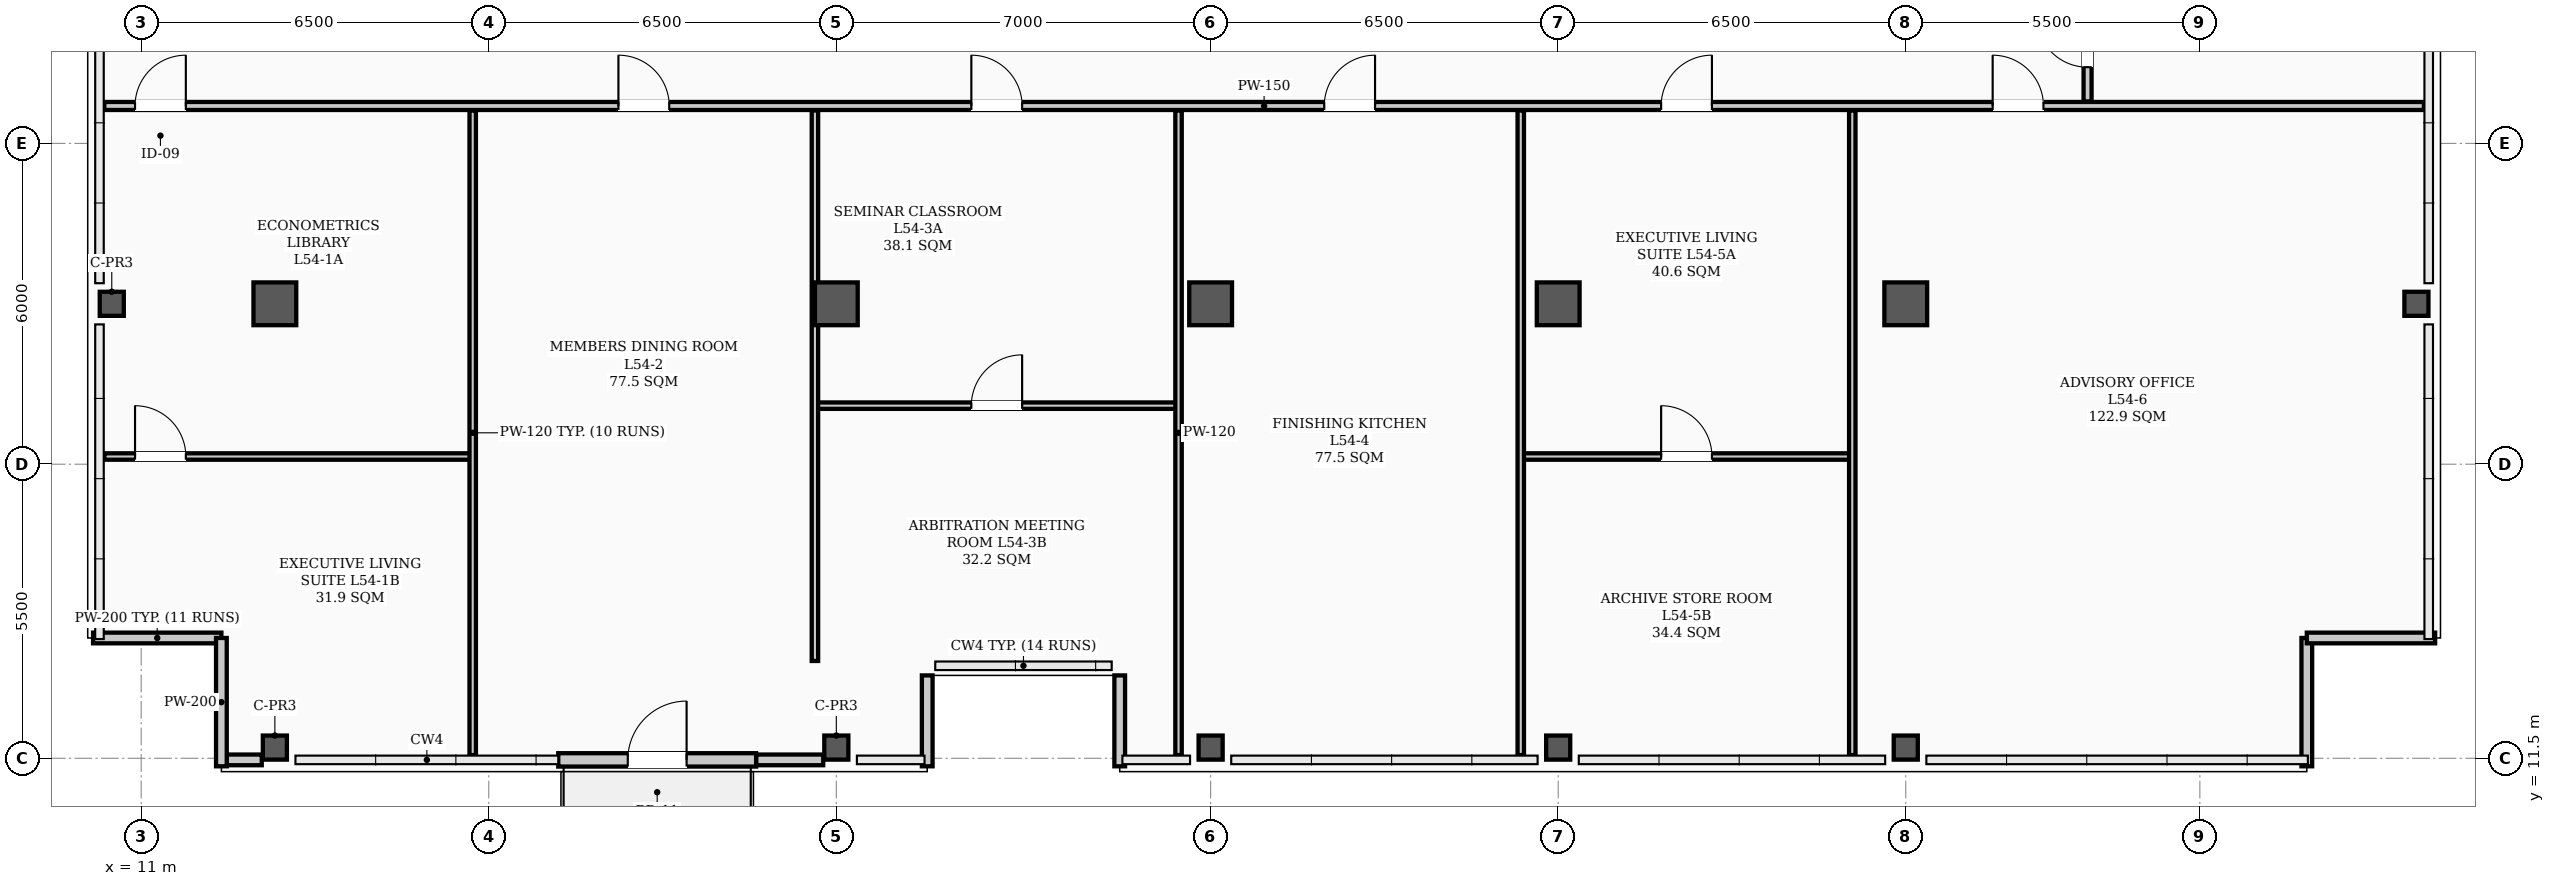
"""IFC4 building model, lengths in metres.
Left out: names, types, materials, properties, quantities, classifications, styles, units other than length and angle.
Written with IfcOpenShell. Run it as: python <this file> out.ifc"""

import sys

from ifc_helpers import new_model, si_unit, direction, frame, frame_2d, origin, origin_2d, place, context, subcontext, project, spatial, rectangle, hollow_rectangle, extrude, element, fill, save


model = new_model("IFC4")
c1 = context("Model", 3, precision=1e-05, world=origin(), true_north=direction((0.0, 1.0)))
c2 = subcontext(c1, "Body", "Model", "MODEL_VIEW")
j1 = project(units=[si_unit("LENGTHUNIT", "METRE"), si_unit("PLANEANGLEUNIT", "RADIAN")], contexts=[c1])
p1 = place(None, origin())
s1 = spatial("IfcSite", under=j1, at=p1, CompositionType="ELEMENT")
p2 = place(p1, origin())
s2 = spatial("IfcBuilding", under=s1, at=p2, CompositionType="ELEMENT")
p3 = place(p2, frame((0.0, 0.0, 218.9)))
s3 = spatial("IfcBuildingStorey", under=s2, at=p3, CompositionType="ELEMENT", Elevation=218.9)
for number, where, z_axis, x_axis in (
    (1, (13.5, 20.0, 0.0), (0.0, 0.0, 1.0), (1.0, 0.0, 0.0)),
    (2, (24.0, 20.0, 0.0), (0.0, 0.0, 1.0), (1.0, 0.0, 0.0)),
    (3, (31.0, 20.0, 0.0), (0.0, 0.0, 1.0), (1.0, 0.0, 0.0)),
    (4, (37.5, 20.0, 0.0), (0.0, 0.0, 1.0), (1.0, 0.0, 0.0)),
    (5, (44.0, 20.0, 0.0), (0.0, 0.0, 1.0), (1.0, 0.0, 0.0)),
):
    element("IfcColumn", number, at=place(p3, frame(where, z_axis=z_axis, x_axis=x_axis)), inside=s3, PredefinedType="COLUMN", context=c2, shape_type="SweptSolid", body=[
        extrude(hollow_rectangle(XDim=0.8, YDim=0.8, WallThickness=0.032, InnerFilletRadius=0.016, OuterFilletRadius=0.048, at=origin_2d()), origin(), (0.0, 0.0, 1.0), 3.9),
    ])
for number, where, z_axis, x_axis in (
    (6, (10.45, 20.0, 0.0), (0.0, 0.0, 1.0), (1.0, 0.0, 0.0)),
    (7, (13.5, 11.7, 0.0), (0.0, 0.0, 1.0), (1.0, 0.0, 0.0)),
    (8, (24.0, 11.7, 0.0), (0.0, 0.0, 1.0), (1.0, 0.0, 0.0)),
    (9, (31.0, 11.7, 0.0), (0.0, 0.0, 1.0), (1.0, 0.0, 0.0)),
    (10, (37.5, 11.7, 0.0), (0.0, 0.0, 1.0), (1.0, 0.0, 0.0)),
    (11, (44.0, 11.7, 0.0), (0.0, 0.0, 1.0), (1.0, 0.0, 0.0)),
    (12, (53.55, 20.0, 0.0), (0.0, 0.0, 1.0), (1.0, 0.0, 0.0)),
):
    element("IfcColumn", number, at=place(p3, frame(where, z_axis=z_axis, x_axis=x_axis)), inside=s3, PredefinedType="COLUMN", context=c2, shape_type="SweptSolid", body=[
        extrude(hollow_rectangle(XDim=0.45, YDim=0.45, WallThickness=0.022, InnerFilletRadius=0.022, OuterFilletRadius=0.044, at=origin_2d()), origin(), (0.0, 0.0, 1.0), 3.9),
    ])
p4 = place(p3, frame((12.6, 11.47, 0.0), z_axis=(0.0, 0.0, 1.0), x_axis=(1.0, 0.0, 0.0)))
e13 = element("IfcWall", 13, at=p4, inside=s3, PredefinedType="PARAPET", context=c2, shape_type="SweptSolid", body=[
    extrude(rectangle(XDim=0.655, YDim=0.2, at=frame_2d((0.327, 0.0))), origin(), (0.0, 0.0, 1.0), 1.2),
])
p5 = place(p3, frame((22.5, 11.47, 0.0), z_axis=(0.0, 0.0, 1.0), x_axis=(1.0, 0.0, 0.0)))
e14 = element("IfcWall", 14, at=p5, inside=s3, PredefinedType="PARAPET", context=c2, shape_type="SweptSolid", body=[
    extrude(rectangle(XDim=1.255, YDim=0.2, at=frame_2d((0.627, 0.0))), origin(), (0.0, 0.0, 1.0), 1.2),
])
for number, where, z_axis, x_axis in (
    (15, (10.1, 13.75, 0.0), (0.0, 0.0, 1.0), (1.0, 0.0, 0.0)),
    (16, (12.5, 13.75, 0.0), (0.0, 0.0, 1.0), (0.0, -1.0, 0.0)),
    (17, (51.5, 11.35, 0.0), (0.0, 0.0, 1.0), (0.0, 1.0, 0.0)),
    (18, (51.5, 13.75, 0.0), (0.0, 0.0, 1.0), (1.0, 0.0, 0.0)),
):
    element("IfcWall", number, at=place(p3, frame(where, z_axis=z_axis, x_axis=x_axis)), inside=s3, PredefinedType="PARAPET", context=c2, shape_type="SweptSolid", body=[
        extrude(rectangle(XDim=2.4, YDim=0.2, at=frame_2d((1.2, 0.0))), origin(), (0.0, 0.0, 1.0), 1.2),
    ])
for number, where, z_axis, x_axis in (
    (19, (25.7, 11.35, 0.0), (0.0, 0.0, 1.0), (0.0, 1.0, 0.0)),
    (20, (29.3, 13.05, 0.0), (0.0, 0.0, 1.0), (0.0, -1.0, 0.0)),
):
    element("IfcWall", number, at=place(p3, frame(where, z_axis=z_axis, x_axis=x_axis)), inside=s3, PredefinedType="PARAPET", context=c2, shape_type="SweptSolid", body=[
        extrude(rectangle(XDim=1.7, YDim=0.2, at=frame_2d((0.85, 0.0))), origin(), (0.0, 0.0, 1.0), 1.2),
    ])
p6 = place(p3, frame((18.8, 11.47, 0.0), z_axis=(0.0, 0.0, 1.0), x_axis=(1.0, 0.0, 0.0)))
e21 = element("IfcWall", 21, at=p6, inside=s3, PredefinedType="STANDARD", context=c2, shape_type="SweptSolid", body=[
    extrude(rectangle(XDim=3.7, YDim=0.25, at=frame_2d((1.85, 0.0))), origin(), (0.0, 0.0, 1.0), 3.18),
])
p7 = place(p6, frame((1.3, 0.0, 0.0)))
e22 = element("IfcOpeningElement", 22, at=p7, cuts=e21, PredefinedType="OPENING", context=c2, shape_type="SweptSolid", body=[
    extrude(rectangle(XDim=1.1, YDim=2.2, at=frame_2d((0.55, 1.1))), frame((0.0, 0.135, 0.0), z_axis=(0.0, -1.0, 0.0), x_axis=(1.0, 0.0, 0.0)), (0.0, 0.0, 1.0), 0.27),
])
p8 = place(p3, frame((10.31, 23.7, 0.0), z_axis=(0.0, 0.0, 1.0), x_axis=(1.0, 0.0, 0.0)))
e23 = element("IfcWall", 23, at=p8, inside=s3, PredefinedType="PARTITIONING", context=c2, shape_type="SweptSolid", body=[
    extrude(rectangle(XDim=43.38, YDim=0.15, at=frame_2d((21.69, 0.0))), origin(), (0.0, 0.0, 1.0), 3.2),
])
p9 = place(p8, frame((0.575, 0.0, 0.0)))
e24 = element("IfcOpeningElement", 24, at=p9, cuts=e23, PredefinedType="OPENING", context=c2, shape_type="SweptSolid", body=[
    extrude(rectangle(XDim=0.95, YDim=2.08, at=frame_2d((0.475, 1.04))), frame((0.0, 0.085, 0.0), z_axis=(0.0, -1.0, 0.0), x_axis=(1.0, 0.0, 0.0)), (0.0, 0.0, 1.0), 0.17),
])
p10 = place(p8, frame((9.615, 0.0, 0.0)))
e25 = element("IfcOpeningElement", 25, at=p10, cuts=e23, PredefinedType="OPENING", context=c2, shape_type="SweptSolid", body=[
    extrude(rectangle(XDim=0.95, YDim=2.08, at=frame_2d((0.475, 1.04))), frame((0.0, 0.085, 0.0), z_axis=(0.0, -1.0, 0.0), x_axis=(1.0, 0.0, 0.0)), (0.0, 0.0, 1.0), 0.17),
])
p11 = place(p8, frame((16.215, 0.0, 0.0)))
e26 = element("IfcOpeningElement", 26, at=p11, cuts=e23, PredefinedType="OPENING", context=c2, shape_type="SweptSolid", body=[
    extrude(rectangle(XDim=0.95, YDim=2.08, at=frame_2d((0.475, 1.04))), frame((0.0, 0.085, 0.0), z_axis=(0.0, -1.0, 0.0), x_axis=(1.0, 0.0, 0.0)), (0.0, 0.0, 1.0), 0.17),
])
p12 = place(p8, frame((22.815, 0.0, 0.0)))
e27 = element("IfcOpeningElement", 27, at=p12, cuts=e23, PredefinedType="OPENING", context=c2, shape_type="SweptSolid", body=[
    extrude(rectangle(XDim=0.95, YDim=2.08, at=frame_2d((0.475, 1.04))), frame((0.0, 0.085, 0.0), z_axis=(0.0, -1.0, 0.0), x_axis=(1.0, 0.0, 0.0)), (0.0, 0.0, 1.0), 0.17),
])
p13 = place(p8, frame((29.115, 0.0, 0.0)))
e28 = element("IfcOpeningElement", 28, at=p13, cuts=e23, PredefinedType="OPENING", context=c2, shape_type="SweptSolid", body=[
    extrude(rectangle(XDim=0.95, YDim=2.08, at=frame_2d((0.475, 1.04))), frame((0.0, 0.085, 0.0), z_axis=(0.0, -1.0, 0.0), x_axis=(1.0, 0.0, 0.0)), (0.0, 0.0, 1.0), 0.17),
])
p14 = place(p8, frame((35.315, 0.0, 0.0)))
e29 = element("IfcOpeningElement", 29, at=p14, cuts=e23, PredefinedType="OPENING", context=c2, shape_type="SweptSolid", body=[
    extrude(rectangle(XDim=0.95, YDim=2.08, at=frame_2d((0.475, 1.04))), frame((0.0, 0.085, 0.0), z_axis=(0.0, -1.0, 0.0), x_axis=(1.0, 0.0, 0.0)), (0.0, 0.0, 1.0), 0.17),
])
p15 = place(p3, frame((10.31, 17.144, 0.0), z_axis=(0.0, 0.0, 1.0), x_axis=(1.0, 0.0, 0.0)))
e30 = element("IfcWall", 30, at=p15, inside=s3, PredefinedType="PARTITIONING", context=c2, shape_type="SweptSolid", body=[
    extrude(rectangle(XDim=6.89, YDim=0.12, at=frame_2d((3.445, 0.0))), origin(), (0.0, 0.0, 1.0), 3.2),
])
p16 = place(p15, frame((0.575, 0.0, 0.0)))
e31 = element("IfcOpeningElement", 31, at=p16, cuts=e30, PredefinedType="OPENING", context=c2, shape_type="SweptSolid", body=[
    extrude(rectangle(XDim=0.95, YDim=2.08, at=frame_2d((0.475, 1.04))), frame((0.0, 0.07, 0.0), z_axis=(0.0, -1.0, 0.0), x_axis=(1.0, 0.0, 0.0)), (0.0, 0.0, 1.0), 0.14),
])
p17 = place(p3, frame((23.6, 18.095, 0.0), z_axis=(0.0, 0.0, 1.0), x_axis=(1.0, 0.0, 0.0)))
e32 = element("IfcWall", 32, at=p17, inside=s3, PredefinedType="PARTITIONING", context=c2, shape_type="SweptSolid", body=[
    extrude(rectangle(XDim=6.8, YDim=0.12, at=frame_2d((3.4, 0.0))), origin(), (0.0, 0.0, 1.0), 3.2),
])
p18 = place(p17, frame((2.925, 0.0, 0.0)))
e33 = element("IfcOpeningElement", 33, at=p18, cuts=e32, PredefinedType="OPENING", context=c2, shape_type="SweptSolid", body=[
    extrude(rectangle(XDim=0.95, YDim=2.08, at=frame_2d((0.475, 1.04))), frame((0.0, 0.07, 0.0), z_axis=(0.0, -1.0, 0.0), x_axis=(1.0, 0.0, 0.0)), (0.0, 0.0, 1.0), 0.14),
])
p19 = place(p3, frame((36.8, 17.144, 0.0), z_axis=(0.0, 0.0, 1.0), x_axis=(1.0, 0.0, 0.0)))
e34 = element("IfcWall", 34, at=p19, inside=s3, PredefinedType="PARTITIONING", context=c2, shape_type="SweptSolid", body=[
    extrude(rectangle(XDim=6.2, YDim=0.12, at=frame_2d((3.1, 0.0))), origin(), (0.0, 0.0, 1.0), 3.2),
])
p20 = place(p19, frame((2.625, 0.0, 0.0)))
e35 = element("IfcOpeningElement", 35, at=p20, cuts=e34, PredefinedType="OPENING", context=c2, shape_type="SweptSolid", body=[
    extrude(rectangle(XDim=0.95, YDim=2.08, at=frame_2d((0.475, 1.04))), frame((0.0, 0.07, 0.0), z_axis=(0.0, -1.0, 0.0), x_axis=(1.0, 0.0, 0.0)), (0.0, 0.0, 1.0), 0.14),
])
p21 = place(p3, frame((47.4, 23.785, 0.0), z_axis=(0.0, 0.0, 1.0), x_axis=(0.0, 1.0, 0.0)))
e36 = element("IfcWall", 36, at=p21, inside=s3, PredefinedType="PARTITIONING", context=c2, shape_type="SweptSolid", body=[
    extrude(rectangle(XDim=13.13, YDim=0.15, at=frame_2d((6.565, 0.0))), origin(), (0.0, 0.0, 1.0), 3.1),
])
p22 = place(p21, frame((0.64, 0.0, 0.0)))
e37 = element("IfcOpeningElement", 37, at=p22, cuts=e36, PredefinedType="OPENING", context=c2, shape_type="SweptSolid", body=[
    extrude(rectangle(XDim=0.95, YDim=2.08, at=frame_2d((0.475, 1.04))), frame((0.0, 0.085, 0.0), z_axis=(0.0, -1.0, 0.0), x_axis=(1.0, 0.0, 0.0)), (0.0, 0.0, 1.0), 0.17),
])
p23 = place(p21, frame((10.44, 0.0, 0.0)))
e38 = element("IfcOpeningElement", 38, at=p23, cuts=e36, PredefinedType="OPENING", context=c2, shape_type="SweptSolid", body=[
    extrude(rectangle(XDim=0.95, YDim=2.08, at=frame_2d((0.475, 1.04))), frame((0.0, 0.085, 0.0), z_axis=(0.0, -1.0, 0.0), x_axis=(1.0, 0.0, 0.0)), (0.0, 0.0, 1.0), 0.17),
])
p24 = place(p3, frame((17.2, 11.56, 0.0), z_axis=(0.0, 0.0, 1.0), x_axis=(0.0, 1.0, 0.0)))
e39 = element("IfcWall", 39, at=p24, inside=s3, PredefinedType="PARTITIONING", context=c2, shape_type="SweptSolid", body=[
    extrude(rectangle(XDim=12.055, YDim=0.12, at=frame_2d((6.027, 0.0))), origin(), (0.0, 0.0, 1.0), 3.1),
])
p25 = place(p3, frame((23.6, 13.32, 0.0), z_axis=(0.0, 0.0, 1.0), x_axis=(0.0, 1.0, 0.0)))
e40 = element("IfcWall", 40, at=p25, inside=s3, PredefinedType="PARTITIONING", context=c2, shape_type="SweptSolid", body=[
    extrude(rectangle(XDim=10.295, YDim=0.12, at=frame_2d((5.147, 0.0))), origin(), (0.0, 0.0, 1.0), 3.1),
])
for number, where, z_axis, x_axis in (
    (41, (30.4, 11.56, 0.0), (0.0, 0.0, 1.0), (0.0, 1.0, 0.0)),
    (42, (36.8, 11.56, 0.0), (0.0, 0.0, 1.0), (0.0, 1.0, 0.0)),
    (43, (43.0, 11.56, 0.0), (0.0, 0.0, 1.0), (0.0, 1.0, 0.0)),
):
    element("IfcWall", number, at=place(p3, frame(where, z_axis=z_axis, x_axis=x_axis)), inside=s3, PredefinedType="PARTITIONING", context=c2, shape_type="SweptSolid", body=[
        extrude(rectangle(XDim=12.055, YDim=0.12, at=frame_2d((6.027, 0.0))), origin(), (0.0, 0.0, 1.0), 3.1),
    ])
p26 = place(p7, origin())
e44 = element("IfcDoor", 44, at=p26, inside=s3, OperationType="SINGLE_SWING_RIGHT", PredefinedType="DOOR", context=c2, shape_type="SweptSolid", body=[
    extrude(rectangle(XDim=1.1, YDim=2.2, at=frame_2d((0.55, 1.1))), frame((0.0, 0.025, 0.0), z_axis=(0.0, -1.0, 0.0), x_axis=(1.0, 0.0, 0.0)), (0.0, 0.0, 1.0), 0.05),
])
fill(e22, e44)
p27 = place(p16, origin())
e45 = element("IfcDoor", 45, at=p27, inside=s3, OperationType="SINGLE_SWING_LEFT", PredefinedType="DOOR", context=c2, shape_type="SweptSolid", body=[
    extrude(rectangle(XDim=0.95, YDim=2.08, at=frame_2d((0.475, 1.04))), frame((0.0, 0.025, 0.0), z_axis=(0.0, -1.0, 0.0), x_axis=(1.0, 0.0, 0.0)), (0.0, 0.0, 1.0), 0.05),
])
fill(e31, e45)
p28 = place(p9, origin())
e46 = element("IfcDoor", 46, at=p28, inside=s3, OperationType="SINGLE_SWING_RIGHT", PredefinedType="DOOR", context=c2, shape_type="SweptSolid", body=[
    extrude(rectangle(XDim=0.95, YDim=2.08, at=frame_2d((0.475, 1.04))), frame((0.0, 0.025, 0.0), z_axis=(0.0, -1.0, 0.0), x_axis=(1.0, 0.0, 0.0)), (0.0, 0.0, 1.0), 0.05),
])
fill(e24, e46)
p29 = place(p10, origin())
e47 = element("IfcDoor", 47, at=p29, inside=s3, OperationType="SINGLE_SWING_LEFT", PredefinedType="DOOR", context=c2, shape_type="SweptSolid", body=[
    extrude(rectangle(XDim=0.95, YDim=2.08, at=frame_2d((0.475, 1.04))), frame((0.0, 0.025, 0.0), z_axis=(0.0, -1.0, 0.0), x_axis=(1.0, 0.0, 0.0)), (0.0, 0.0, 1.0), 0.05),
])
fill(e25, e47)
p30 = place(p18, origin())
e48 = element("IfcDoor", 48, at=p30, inside=s3, OperationType="SINGLE_SWING_RIGHT", PredefinedType="DOOR", context=c2, shape_type="SweptSolid", body=[
    extrude(rectangle(XDim=0.95, YDim=2.08, at=frame_2d((0.475, 1.04))), frame((0.0, 0.025, 0.0), z_axis=(0.0, -1.0, 0.0), x_axis=(1.0, 0.0, 0.0)), (0.0, 0.0, 1.0), 0.05),
])
fill(e33, e48)
p31 = place(p11, origin())
e49 = element("IfcDoor", 49, at=p31, inside=s3, OperationType="SINGLE_SWING_LEFT", PredefinedType="DOOR", context=c2, shape_type="SweptSolid", body=[
    extrude(rectangle(XDim=0.95, YDim=2.08, at=frame_2d((0.475, 1.04))), frame((0.0, 0.025, 0.0), z_axis=(0.0, -1.0, 0.0), x_axis=(1.0, 0.0, 0.0)), (0.0, 0.0, 1.0), 0.05),
])
fill(e26, e49)
p32 = place(p12, origin())
e50 = element("IfcDoor", 50, at=p32, inside=s3, OperationType="SINGLE_SWING_RIGHT", PredefinedType="DOOR", context=c2, shape_type="SweptSolid", body=[
    extrude(rectangle(XDim=0.95, YDim=2.08, at=frame_2d((0.475, 1.04))), frame((0.0, 0.025, 0.0), z_axis=(0.0, -1.0, 0.0), x_axis=(1.0, 0.0, 0.0)), (0.0, 0.0, 1.0), 0.05),
])
fill(e27, e50)
p33 = place(p20, origin())
e51 = element("IfcDoor", 51, at=p33, inside=s3, OperationType="SINGLE_SWING_LEFT", PredefinedType="DOOR", context=c2, shape_type="SweptSolid", body=[
    extrude(rectangle(XDim=0.95, YDim=2.08, at=frame_2d((0.475, 1.04))), frame((0.0, 0.025, 0.0), z_axis=(0.0, -1.0, 0.0), x_axis=(1.0, 0.0, 0.0)), (0.0, 0.0, 1.0), 0.05),
])
fill(e35, e51)
p34 = place(p13, origin())
e52 = element("IfcDoor", 52, at=p34, inside=s3, OperationType="SINGLE_SWING_RIGHT", PredefinedType="DOOR", context=c2, shape_type="SweptSolid", body=[
    extrude(rectangle(XDim=0.95, YDim=2.08, at=frame_2d((0.475, 1.04))), frame((0.0, 0.025, 0.0), z_axis=(0.0, -1.0, 0.0), x_axis=(1.0, 0.0, 0.0)), (0.0, 0.0, 1.0), 0.05),
])
fill(e28, e52)
p35 = place(p14, origin())
e53 = element("IfcDoor", 53, at=p35, inside=s3, OperationType="SINGLE_SWING_LEFT", PredefinedType="DOOR", context=c2, shape_type="SweptSolid", body=[
    extrude(rectangle(XDim=0.95, YDim=2.08, at=frame_2d((0.475, 1.04))), frame((0.0, 0.025, 0.0), z_axis=(0.0, -1.0, 0.0), x_axis=(1.0, 0.0, 0.0)), (0.0, 0.0, 1.0), 0.05),
])
fill(e29, e53)
p36 = place(p22, origin())
e54 = element("IfcDoor", 54, at=p36, inside=s3, OperationType="SINGLE_SWING_RIGHT", PredefinedType="DOOR", context=c2, shape_type="SweptSolid", body=[
    extrude(rectangle(XDim=0.95, YDim=2.08, at=frame_2d((0.475, 1.04))), frame((0.0, 0.025, 0.0), z_axis=(0.0, -1.0, 0.0), x_axis=(1.0, 0.0, 0.0)), (0.0, 0.0, 1.0), 0.05),
])
fill(e37, e54)
save(model, sys.argv[1])
